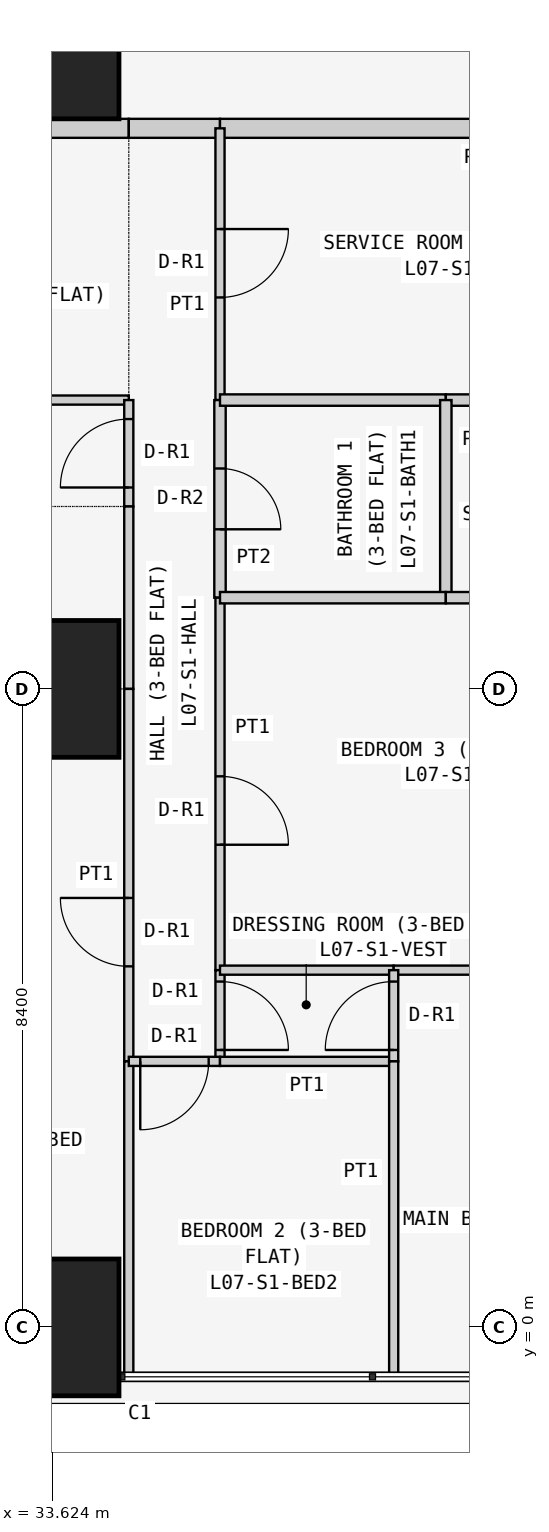
"""IFC4 building model, lengths in metres.
Left out: names, types, materials, properties, quantities, classifications, styles, units other than length and angle.
Written with IfcOpenShell. Run it as: python <this file> out.ifc"""

import sys

from ifc_helpers import new_model, si_unit, direction, frame, frame_2d, origin, origin_2d, place, context, subcontext, project, spatial, rectangle, extrude, element, fill, save


model = new_model("IFC4")
c1 = context("Model", 3, precision=1e-05, world=origin(), true_north=direction((0.0, 1.0)))
c2 = subcontext(c1, "Body", "Model", "MODEL_VIEW")
j1 = project(units=[si_unit("LENGTHUNIT", "METRE"), si_unit("PLANEANGLEUNIT", "RADIAN")], contexts=[c1])
p1 = place(None, origin())
s1 = spatial("IfcSite", under=j1, at=p1, CompositionType="ELEMENT")
p2 = place(p1, origin())
s2 = spatial("IfcBuilding", under=s1, at=p2, CompositionType="ELEMENT")
p3 = place(p2, frame((0.0, 0.0, 34.5)))
s3 = spatial("IfcBuildingStorey", under=s2, at=p3, CompositionType="ELEMENT", Elevation=34.5)
for number, where, z_axis, x_axis in (
    (1, (33.6, 0.0, 0.0), (0.0, 0.0, 1.0), (1.0, 0.0, 0.0)),
    (2, (33.6, 8.4, 0.0), (0.0, 0.0, 1.0), (1.0, 0.0, 0.0)),
    (3, (33.6, 16.8, 0.0), (0.0, 0.0, 1.0), (1.0, 0.0, 0.0)),
):
    element("IfcColumn", number, at=place(p3, frame(where, z_axis=z_axis, x_axis=x_axis)), inside=s3, PredefinedType="COLUMN", context=c2, shape_type="SweptSolid", body=[
        extrude(rectangle(XDim=1.8, YDim=1.8, at=origin_2d()), origin(), (0.0, 0.0, 1.0), 3.6),
    ])
p4 = place(p3, frame((34.629, 15.775, 0.0), z_axis=(0.0, 0.0, 1.0), x_axis=(-1.0, 0.0, 0.0)))
e4 = element("IfcWall", 4, at=p4, inside=s3, PredefinedType="PARTITIONING", context=c2, shape_type="SweptSolid", body=[
    extrude(rectangle(XDim=5.229, YDim=0.25, at=frame_2d((2.615, 0.0))), origin(), (0.0, 0.0, 1.0), 3.45),
])
p5 = place(p4, frame((2.129, 0.0, 0.0)))
e5 = element("IfcOpeningElement", 5, at=p5, cuts=e4, PredefinedType="OPENING", context=c2, shape_type="SweptSolid", body=[
    extrude(rectangle(XDim=1.0, YDim=2.1, at=frame_2d((0.5, 1.05))), frame((0.0, 0.135, 0.0), z_axis=(0.0, -1.0, 0.0), x_axis=(1.0, 0.0, 0.0)), (0.0, 0.0, 1.0), 0.27),
])
p6 = place(p3, frame((35.829, 15.775, 0.0), z_axis=(0.0, 0.0, 1.0), x_axis=(-1.0, 0.0, 0.0)))
e6 = element("IfcWall", 6, at=p6, inside=s3, PredefinedType="PARTITIONING", context=c2, shape_type="SweptSolid", body=[
    extrude(rectangle(XDim=1.2, YDim=0.25, at=frame_2d((0.6, 0.0))), origin(), (0.0, 0.0, 1.0), 3.45),
])
p7 = place(p3, frame((42.7, 15.775, 0.0), z_axis=(0.0, 0.0, 1.0), x_axis=(-1.0, 0.0, 0.0)))
e7 = element("IfcWall", 7, at=p7, inside=s3, PredefinedType="PARTITIONING", context=c2, shape_type="SweptSolid", body=[
    extrude(rectangle(XDim=6.871, YDim=0.25, at=frame_2d((3.436, 0.0))), origin(), (0.0, 0.0, 1.0), 3.45),
])
p8 = place(p3, frame((29.4, 12.2, 0.0), z_axis=(0.0, 0.0, 1.0), x_axis=(1.0, 0.0, 0.0)))
e8 = element("IfcWall", 8, at=p8, inside=s3, PredefinedType="PARTITIONING", context=c2, shape_type="SweptSolid", body=[
    extrude(rectangle(XDim=5.229, YDim=0.12, at=frame_2d((2.615, 0.0))), origin(), (0.0, 0.0, 1.0), 3.45),
])
p9 = place(p3, frame((34.629, 10.8, 0.0), z_axis=(0.0, 0.0, 1.0), x_axis=(0.0, 1.0, 0.0)))
e9 = element("IfcWall", 9, at=p9, inside=s3, PredefinedType="PARTITIONING", context=c2, shape_type="SweptSolid", body=[
    extrude(rectangle(XDim=1.4, YDim=0.12, at=frame_2d((0.7, 0.0))), origin(), (0.0, 0.0, 1.0), 3.45),
])
p10 = place(p9, frame((0.25, 0.0, 0.0)))
e10 = element("IfcOpeningElement", 10, at=p10, cuts=e9, PredefinedType="OPENING", context=c2, shape_type="SweptSolid", body=[
    extrude(rectangle(XDim=0.9, YDim=2.1, at=frame_2d((0.45, 1.05))), frame((0.0, 0.07, 0.0), z_axis=(0.0, -1.0, 0.0), x_axis=(1.0, 0.0, 0.0)), (0.0, 0.0, 1.0), 0.14),
])
p11 = place(p3, frame((34.629, 8.4, 0.0), z_axis=(0.0, 0.0, 1.0), x_axis=(0.0, 1.0, 0.0)))
e11 = element("IfcWall", 11, at=p11, inside=s3, PredefinedType="PARTITIONING", context=c2, shape_type="SweptSolid", body=[
    extrude(rectangle(XDim=2.4, YDim=0.12, at=frame_2d((1.2, 0.0))), origin(), (0.0, 0.0, 1.0), 3.45),
])
p12 = place(p3, frame((34.629, 3.5, 0.0), z_axis=(0.0, 0.0, 1.0), x_axis=(0.0, 1.0, 0.0)))
e12 = element("IfcWall", 12, at=p12, inside=s3, PredefinedType="PARTITIONING", context=c2, shape_type="SweptSolid", body=[
    extrude(rectangle(XDim=4.9, YDim=0.12, at=frame_2d((2.45, 0.0))), origin(), (0.0, 0.0, 1.0), 3.45),
])
p13 = place(p12, frame((1.25, 0.0, 0.0)))
e13 = element("IfcOpeningElement", 13, at=p13, cuts=e12, PredefinedType="OPENING", context=c2, shape_type="SweptSolid", body=[
    extrude(rectangle(XDim=0.9, YDim=2.1, at=frame_2d((0.45, 1.05))), frame((0.0, 0.07, 0.0), z_axis=(0.0, -1.0, 0.0), x_axis=(1.0, 0.0, 0.0)), (0.0, 0.0, 1.0), 0.14),
])
p14 = place(p3, frame((34.629, -0.65, 0.0), z_axis=(0.0, 0.0, 1.0), x_axis=(0.0, 1.0, 0.0)))
e14 = element("IfcWall", 14, at=p14, inside=s3, PredefinedType="PARTITIONING", context=c2, shape_type="SweptSolid", body=[
    extrude(rectangle(XDim=4.15, YDim=0.12, at=frame_2d((2.075, 0.0))), origin(), (0.0, 0.0, 1.0), 3.45),
])
p15 = place(p3, frame((35.829, 12.2, 0.0), z_axis=(0.0, 0.0, 1.0), x_axis=(0.0, 1.0, 0.0)))
e15 = element("IfcWall", 15, at=p15, inside=s3, PredefinedType="PARTITIONING", context=c2, shape_type="SweptSolid", body=[
    extrude(rectangle(XDim=3.575, YDim=0.12, at=frame_2d((1.788, 0.0))), origin(), (0.0, 0.0, 1.0), 3.45),
])
p16 = place(p15, frame((1.35, 0.0, 0.0)))
e16 = element("IfcOpeningElement", 16, at=p16, cuts=e15, PredefinedType="OPENING", context=c2, shape_type="SweptSolid", body=[
    extrude(rectangle(XDim=0.9, YDim=2.1, at=frame_2d((0.45, 1.05))), frame((0.0, 0.07, 0.0), z_axis=(0.0, -1.0, 0.0), x_axis=(1.0, 0.0, 0.0)), (0.0, 0.0, 1.0), 0.14),
])
p17 = place(p3, frame((35.829, 9.6, 0.0), z_axis=(0.0, 0.0, 1.0), x_axis=(0.0, 1.0, 0.0)))
e17 = element("IfcWall", 17, at=p17, inside=s3, PredefinedType="PARTITIONING", context=c2, shape_type="SweptSolid", body=[
    extrude(rectangle(XDim=2.6, YDim=0.15, at=frame_2d((1.3, 0.0))), origin(), (0.0, 0.0, 1.0), 3.45),
])
p18 = place(p17, frame((0.9, 0.0, 0.0)))
e18 = element("IfcOpeningElement", 18, at=p18, cuts=e17, PredefinedType="OPENING", context=c2, shape_type="SweptSolid", body=[
    extrude(rectangle(XDim=0.8, YDim=2.1, at=frame_2d((0.4, 1.05))), frame((0.0, 0.085, 0.0), z_axis=(0.0, -1.0, 0.0), x_axis=(1.0, 0.0, 0.0)), (0.0, 0.0, 1.0), 0.17),
])
p19 = place(p3, frame((35.829, 4.7, 0.0), z_axis=(0.0, 0.0, 1.0), x_axis=(0.0, 1.0, 0.0)))
e19 = element("IfcWall", 19, at=p19, inside=s3, PredefinedType="PARTITIONING", context=c2, shape_type="SweptSolid", body=[
    extrude(rectangle(XDim=4.9, YDim=0.12, at=frame_2d((2.45, 0.0))), origin(), (0.0, 0.0, 1.0), 3.45),
])
p20 = place(p19, frame((1.65, 0.0, 0.0)))
e20 = element("IfcOpeningElement", 20, at=p20, cuts=e19, PredefinedType="OPENING", context=c2, shape_type="SweptSolid", body=[
    extrude(rectangle(XDim=0.9, YDim=2.1, at=frame_2d((0.45, 1.05))), frame((0.0, 0.07, 0.0), z_axis=(0.0, -1.0, 0.0), x_axis=(1.0, 0.0, 0.0)), (0.0, 0.0, 1.0), 0.14),
])
p21 = place(p3, frame((35.829, 3.5, 0.0), z_axis=(0.0, 0.0, 1.0), x_axis=(0.0, 1.0, 0.0)))
e21 = element("IfcWall", 21, at=p21, inside=s3, PredefinedType="PARTITIONING", context=c2, shape_type="SweptSolid", body=[
    extrude(rectangle(XDim=1.2, YDim=0.12, at=frame_2d((0.6, 0.0))), origin(), (0.0, 0.0, 1.0), 3.45),
])
p22 = place(p21, frame((0.15, 0.0, 0.0)))
e22 = element("IfcOpeningElement", 22, at=p22, cuts=e21, PredefinedType="OPENING", context=c2, shape_type="SweptSolid", body=[
    extrude(rectangle(XDim=0.9, YDim=2.1, at=frame_2d((0.45, 1.05))), frame((0.0, 0.07, 0.0), z_axis=(0.0, -1.0, 0.0), x_axis=(1.0, 0.0, 0.0)), (0.0, 0.0, 1.0), 0.14),
])
p23 = place(p3, frame((34.629, 3.5, 0.0), z_axis=(0.0, 0.0, 1.0), x_axis=(1.0, 0.0, 0.0)))
e23 = element("IfcWall", 23, at=p23, inside=s3, PredefinedType="PARTITIONING", context=c2, shape_type="SweptSolid", body=[
    extrude(rectangle(XDim=1.2, YDim=0.12, at=frame_2d((0.6, 0.0))), origin(), (0.0, 0.0, 1.0), 3.45),
])
p24 = place(p23, frame((0.151, 0.0, 0.0)))
e24 = element("IfcOpeningElement", 24, at=p24, cuts=e23, PredefinedType="OPENING", context=c2, shape_type="SweptSolid", body=[
    extrude(rectangle(XDim=0.9, YDim=2.1, at=frame_2d((0.45, 1.05))), frame((0.0, 0.07, 0.0), z_axis=(0.0, -1.0, 0.0), x_axis=(1.0, 0.0, 0.0)), (0.0, 0.0, 1.0), 0.14),
])
p25 = place(p3, frame((35.829, 12.2, 0.0), z_axis=(0.0, 0.0, 1.0), x_axis=(1.0, 0.0, 0.0)))
e25 = element("IfcWall", 25, at=p25, inside=s3, PredefinedType="PARTITIONING", context=c2, shape_type="SweptSolid", body=[
    extrude(rectangle(XDim=2.971, YDim=0.15, at=frame_2d((1.485, 0.0))), origin(), (0.0, 0.0, 1.0), 3.45),
])
p26 = place(p3, frame((38.8, 12.2, 0.0), z_axis=(0.0, 0.0, 1.0), x_axis=(1.0, 0.0, 0.0)))
e26 = element("IfcWall", 26, at=p26, inside=s3, PredefinedType="PARTITIONING", context=c2, shape_type="SweptSolid", body=[
    extrude(rectangle(XDim=3.9, YDim=0.15, at=frame_2d((1.95, 0.0))), origin(), (0.0, 0.0, 1.0), 3.45),
])
p27 = place(p26, frame((1.55, 0.0, 0.0)))
e27 = element("IfcOpeningElement", 27, at=p27, cuts=e26, PredefinedType="OPENING", context=c2, shape_type="SweptSolid", body=[
    extrude(rectangle(XDim=0.8, YDim=2.1, at=frame_2d((0.4, 1.05))), frame((0.0, 0.085, 0.0), z_axis=(0.0, -1.0, 0.0), x_axis=(1.0, 0.0, 0.0)), (0.0, 0.0, 1.0), 0.17),
])
p28 = place(p3, frame((38.8, 9.6, 0.0), z_axis=(0.0, 0.0, 1.0), x_axis=(0.0, 1.0, 0.0)))
e28 = element("IfcWall", 28, at=p28, inside=s3, PredefinedType="PARTITIONING", context=c2, shape_type="SweptSolid", body=[
    extrude(rectangle(XDim=2.6, YDim=0.15, at=frame_2d((1.3, 0.0))), origin(), (0.0, 0.0, 1.0), 3.45),
])
p29 = place(p3, frame((35.829, 9.6, 0.0), z_axis=(0.0, 0.0, 1.0), x_axis=(1.0, 0.0, 0.0)))
e29 = element("IfcWall", 29, at=p29, inside=s3, PredefinedType="PARTITIONING", context=c2, shape_type="SweptSolid", body=[
    extrude(rectangle(XDim=2.971, YDim=0.15, at=frame_2d((1.485, 0.0))), origin(), (0.0, 0.0, 1.0), 3.45),
])
p30 = place(p3, frame((38.8, 9.6, 0.0), z_axis=(0.0, 0.0, 1.0), x_axis=(1.0, 0.0, 0.0)))
e30 = element("IfcWall", 30, at=p30, inside=s3, PredefinedType="PARTITIONING", context=c2, shape_type="SweptSolid", body=[
    extrude(rectangle(XDim=3.9, YDim=0.15, at=frame_2d((1.95, 0.0))), origin(), (0.0, 0.0, 1.0), 3.45),
])
p31 = place(p3, frame((35.829, 4.7, 0.0), z_axis=(0.0, 0.0, 1.0), x_axis=(1.0, 0.0, 0.0)))
e31 = element("IfcWall", 31, at=p31, inside=s3, PredefinedType="PARTITIONING", context=c2, shape_type="SweptSolid", body=[
    extrude(rectangle(XDim=2.285, YDim=0.12, at=frame_2d((1.143, 0.0))), origin(), (0.0, 0.0, 1.0), 3.45),
])
p32 = place(p3, frame((38.114, 4.7, 0.0), z_axis=(0.0, 0.0, 1.0), x_axis=(1.0, 0.0, 0.0)))
e32 = element("IfcWall", 32, at=p32, inside=s3, PredefinedType="PARTITIONING", context=c2, shape_type="SweptSolid", body=[
    extrude(rectangle(XDim=4.586, YDim=0.12, at=frame_2d((2.293, 0.0))), origin(), (0.0, 0.0, 1.0), 3.45),
])
p33 = place(p3, frame((35.829, 3.5, 0.0), z_axis=(0.0, 0.0, 1.0), x_axis=(1.0, 0.0, 0.0)))
e33 = element("IfcWall", 33, at=p33, inside=s3, PredefinedType="PARTITIONING", context=c2, shape_type="SweptSolid", body=[
    extrude(rectangle(XDim=2.285, YDim=0.12, at=frame_2d((1.143, 0.0))), origin(), (0.0, 0.0, 1.0), 3.45),
])
p34 = place(p3, frame((38.114, 3.5, 0.0), z_axis=(0.0, 0.0, 1.0), x_axis=(0.0, 1.0, 0.0)))
e34 = element("IfcWall", 34, at=p34, inside=s3, PredefinedType="PARTITIONING", context=c2, shape_type="SweptSolid", body=[
    extrude(rectangle(XDim=1.2, YDim=0.12, at=frame_2d((0.6, 0.0))), origin(), (0.0, 0.0, 1.0), 3.45),
])
p35 = place(p34, frame((0.15, 0.0, 0.0)))
e35 = element("IfcOpeningElement", 35, at=p35, cuts=e34, PredefinedType="OPENING", context=c2, shape_type="SweptSolid", body=[
    extrude(rectangle(XDim=0.9, YDim=2.1, at=frame_2d((0.45, 1.05))), frame((0.0, 0.07, 0.0), z_axis=(0.0, -1.0, 0.0), x_axis=(1.0, 0.0, 0.0)), (0.0, 0.0, 1.0), 0.14),
])
p36 = place(p3, frame((38.114, -0.65, 0.0), z_axis=(0.0, 0.0, 1.0), x_axis=(0.0, 1.0, 0.0)))
e36 = element("IfcWall", 36, at=p36, inside=s3, PredefinedType="PARTITIONING", context=c2, shape_type="SweptSolid", body=[
    extrude(rectangle(XDim=4.15, YDim=0.12, at=frame_2d((2.075, 0.0))), origin(), (0.0, 0.0, 1.0), 3.45),
])
p37 = place(p10, origin())
e37 = element("IfcDoor", 37, at=p37, inside=s3, OperationType="SINGLE_SWING_LEFT", PredefinedType="DOOR", context=c2, shape_type="SweptSolid", body=[
    extrude(rectangle(XDim=0.9, YDim=2.1, at=frame_2d((0.45, 1.05))), frame((0.0, 0.025, 0.0), z_axis=(0.0, -1.0, 0.0), x_axis=(1.0, 0.0, 0.0)), (0.0, 0.0, 1.0), 0.05),
])
fill(e10, e37)
p38 = place(p13, origin())
e38 = element("IfcDoor", 38, at=p38, inside=s3, OperationType="SINGLE_SWING_RIGHT", PredefinedType="DOOR", context=c2, shape_type="SweptSolid", body=[
    extrude(rectangle(XDim=0.9, YDim=2.1, at=frame_2d((0.45, 1.05))), frame((0.0, 0.025, 0.0), z_axis=(0.0, -1.0, 0.0), x_axis=(1.0, 0.0, 0.0)), (0.0, 0.0, 1.0), 0.05),
])
fill(e13, e38)
p39 = place(p16, frame((0.9, 0.0, 0.0), z_axis=(0.0, 0.0, 1.0), x_axis=(-1.0, 0.0, 0.0)))
e39 = element("IfcDoor", 39, at=p39, inside=s3, OperationType="SINGLE_SWING_LEFT", PredefinedType="DOOR", context=c2, shape_type="SweptSolid", body=[
    extrude(rectangle(XDim=0.9, YDim=2.1, at=frame_2d((0.45, 1.05))), frame((0.0, 0.025, 0.0), z_axis=(0.0, -1.0, 0.0), x_axis=(1.0, 0.0, 0.0)), (0.0, 0.0, 1.0), 0.05),
])
fill(e16, e39)
p40 = place(p18, frame((0.8, 0.0, 0.0), z_axis=(0.0, 0.0, 1.0), x_axis=(-1.0, 0.0, 0.0)))
e40 = element("IfcDoor", 40, at=p40, inside=s3, OperationType="SINGLE_SWING_RIGHT", PredefinedType="DOOR", context=c2, shape_type="SweptSolid", body=[
    extrude(rectangle(XDim=0.8, YDim=2.1, at=frame_2d((0.4, 1.05))), frame((0.0, 0.025, 0.0), z_axis=(0.0, -1.0, 0.0), x_axis=(1.0, 0.0, 0.0)), (0.0, 0.0, 1.0), 0.05),
])
fill(e18, e40)
p41 = place(p20, frame((0.9, 0.0, 0.0), z_axis=(0.0, 0.0, 1.0), x_axis=(-1.0, 0.0, 0.0)))
e41 = element("IfcDoor", 41, at=p41, inside=s3, OperationType="SINGLE_SWING_RIGHT", PredefinedType="DOOR", context=c2, shape_type="SweptSolid", body=[
    extrude(rectangle(XDim=0.9, YDim=2.1, at=frame_2d((0.45, 1.05))), frame((0.0, 0.025, 0.0), z_axis=(0.0, -1.0, 0.0), x_axis=(1.0, 0.0, 0.0)), (0.0, 0.0, 1.0), 0.05),
])
fill(e20, e41)
p42 = place(p22, frame((0.9, 0.0, 0.0), z_axis=(0.0, 0.0, 1.0), x_axis=(-1.0, 0.0, 0.0)))
e42 = element("IfcDoor", 42, at=p42, inside=s3, OperationType="SINGLE_SWING_RIGHT", PredefinedType="DOOR", context=c2, shape_type="SweptSolid", body=[
    extrude(rectangle(XDim=0.9, YDim=2.1, at=frame_2d((0.45, 1.05))), frame((0.0, 0.025, 0.0), z_axis=(0.0, -1.0, 0.0), x_axis=(1.0, 0.0, 0.0)), (0.0, 0.0, 1.0), 0.05),
])
fill(e22, e42)
p43 = place(p35, origin())
e43 = element("IfcDoor", 43, at=p43, inside=s3, OperationType="SINGLE_SWING_LEFT", PredefinedType="DOOR", context=c2, shape_type="SweptSolid", body=[
    extrude(rectangle(XDim=0.9, YDim=2.1, at=frame_2d((0.45, 1.05))), frame((0.0, 0.025, 0.0), z_axis=(0.0, -1.0, 0.0), x_axis=(1.0, 0.0, 0.0)), (0.0, 0.0, 1.0), 0.05),
])
fill(e35, e43)
p44 = place(p24, frame((0.9, 0.0, 0.0), z_axis=(0.0, 0.0, 1.0), x_axis=(-1.0, 0.0, 0.0)))
e44 = element("IfcDoor", 44, at=p44, inside=s3, OperationType="SINGLE_SWING_RIGHT", PredefinedType="DOOR", context=c2, shape_type="SweptSolid", body=[
    extrude(rectangle(XDim=0.9, YDim=2.1, at=frame_2d((0.45, 1.05))), frame((0.0, 0.025, 0.0), z_axis=(0.0, -1.0, 0.0), x_axis=(1.0, 0.0, 0.0)), (0.0, 0.0, 1.0), 0.05),
])
fill(e24, e44)
save(model, sys.argv[1])
